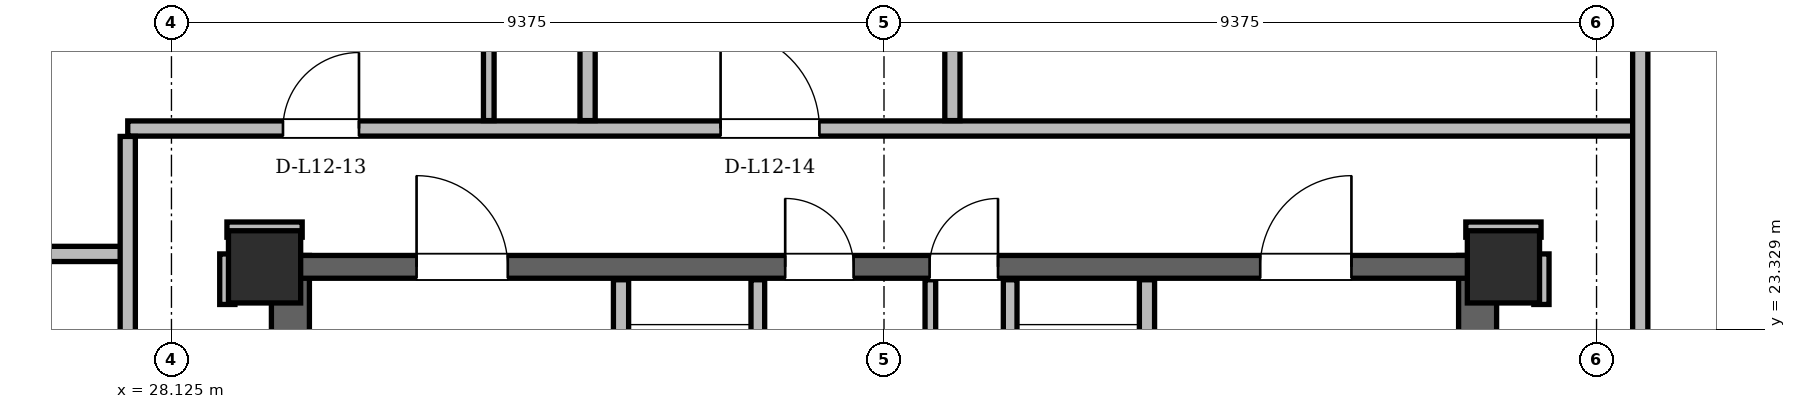
"""IFC4 building model, lengths in metres.
Left out: names, types, materials, properties, quantities, classifications, styles, units other than length and angle.
Written with IfcOpenShell. Run it as: python <this file> out.ifc"""

import sys

from ifc_helpers import new_model, si_unit, direction, frame, frame_2d, origin, origin_2d, place, context, subcontext, project, spatial, rectangle, hollow_rectangle, extrude, element, fill, save


model = new_model("IFC4")
c1 = context("Model", 3, precision=1e-05, world=origin(), true_north=direction((0.0, 1.0)))
c2 = subcontext(c1, "Body", "Model", "MODEL_VIEW")
j1 = project(units=[si_unit("LENGTHUNIT", "METRE"), si_unit("PLANEANGLEUNIT", "RADIAN")], contexts=[c1])
p1 = place(None, origin())
s1 = spatial("IfcSite", under=j1, at=p1, CompositionType="ELEMENT")
p2 = place(p1, origin())
s2 = spatial("IfcBuilding", under=s1, at=p2, CompositionType="ELEMENT")
p3 = place(p2, frame((0.0, 0.0, 48.9)))
s3 = spatial("IfcBuildingStorey", under=s2, at=p3, CompositionType="ELEMENT", Elevation=48.9)
for number, where, z_axis, x_axis in (
    (1, (45.65, 24.15, 0.0), (0.0, 0.0, 1.0), (1.0, 0.0, 0.0)),
    (2, (29.35, 24.15, 0.0), (0.0, 0.0, 1.0), (1.0, 0.0, 0.0)),
):
    element("IfcColumn", number, at=place(p3, frame(where, z_axis=z_axis, x_axis=x_axis)), inside=s3, PredefinedType="COLUMN", context=c2, shape_type="SweptSolid", body=[
        extrude(hollow_rectangle(XDim=0.95, YDim=0.95, WallThickness=0.08, at=origin_2d()), origin(), (0.0, 0.0, 1.0), 3.6),
    ])
for number, where, z_axis, x_axis in (
    (3, (29.69, 11.0, 0.0), (0.0, 0.0, 1.0), (0.0, 1.0, 0.0)),
    (4, (45.31, 11.0, 0.0), (0.0, 0.0, 1.0), (0.0, 1.0, 0.0)),
):
    element("IfcWall", number, at=place(p3, frame(where, z_axis=z_axis, x_axis=x_axis)), inside=s3, PredefinedType="SHEAR", context=c2, shape_type="SweptSolid", body=[
        extrude(rectangle(XDim=13.3, YDim=0.5, at=frame_2d((6.65, 0.0))), origin(), (0.0, 0.0, 1.0), 3.36),
    ])
p4 = place(p3, frame((29.65, 24.15, 0.0), z_axis=(0.0, 0.0, 1.0), x_axis=(1.0, 0.0, 0.0)))
e5 = element("IfcWall", 5, at=p4, inside=s3, PredefinedType="SHEAR", context=c2, shape_type="SweptSolid", body=[
    extrude(rectangle(XDim=15.7, YDim=0.3, at=frame_2d((7.85, 0.0))), origin(), (0.0, 0.0, 1.0), 3.36),
])
p5 = place(p4, frame((1.7, 0.0, 0.0)))
e6 = element("IfcOpeningElement", 6, at=p5, cuts=e5, PredefinedType="OPENING", context=c2, shape_type="SweptSolid", body=[
    extrude(rectangle(XDim=1.2, YDim=2.2, at=frame_2d((0.6, 1.1))), frame((0.0, 0.15, 0.0), z_axis=(0.0, -1.0, 0.0), x_axis=(1.0, 0.0, 0.0)), (0.0, 0.0, 1.0), 0.3),
])
p6 = place(p4, frame((12.8, 0.0, 0.0)))
e7 = element("IfcOpeningElement", 7, at=p6, cuts=e5, PredefinedType="OPENING", context=c2, shape_type="SweptSolid", body=[
    extrude(rectangle(XDim=1.2, YDim=2.2, at=frame_2d((0.6, 1.1))), frame((0.0, 0.15, 0.0), z_axis=(0.0, -1.0, 0.0), x_axis=(1.0, 0.0, 0.0)), (0.0, 0.0, 1.0), 0.3),
])
p7 = place(p4, frame((6.55, 0.0, 0.0)))
e8 = element("IfcOpeningElement", 8, at=p7, cuts=e5, PredefinedType="OPENING", context=c2, shape_type="SweptSolid", body=[
    extrude(rectangle(XDim=0.9, YDim=2.05, at=frame_2d((0.45, 1.025))), frame((0.0, 0.15, 0.0), z_axis=(0.0, -1.0, 0.0), x_axis=(1.0, 0.0, 0.0)), (0.0, 0.0, 1.0), 0.3),
])
p8 = place(p4, frame((8.45, 0.0, 0.0)))
e9 = element("IfcOpeningElement", 9, at=p8, cuts=e5, PredefinedType="OPENING", context=c2, shape_type="SweptSolid", body=[
    extrude(rectangle(XDim=0.9, YDim=2.05, at=frame_2d((0.45, 1.025))), frame((0.0, 0.15, 0.0), z_axis=(0.0, -1.0, 0.0), x_axis=(1.0, 0.0, 0.0)), (0.0, 0.0, 1.0), 0.3),
])
p9 = place(p3, frame((30.133, 43.584, 0.0), z_axis=(0.0, 0.0, 1.0), x_axis=(-0.499998660293, -0.866026177264, 0.0)))
e10 = element("IfcWall", 10, at=p9, inside=s3, PredefinedType="SOLIDWALL", context=c2, shape_type="SweptSolid", body=[
    extrude(rectangle(XDim=33.309, YDim=0.34, at=frame_2d((16.654, 0.0))), origin(), (0.0, 0.0, 1.0), 2.494),
])
p10 = place(p9, frame((6.159, 0.0, 0.0)))
e11 = element("IfcOpeningElement", 11, at=p10, cuts=e10, PredefinedType="OPENING", context=c2, shape_type="SweptSolid", body=[
    extrude(rectangle(XDim=1.5, YDim=2.2, at=frame_2d((0.75, 1.1))), frame((0.0, 0.17, 0.0), z_axis=(0.0, -1.0, 0.0), x_axis=(1.0, 0.0, 0.0)), (0.0, 0.0, 1.0), 0.34),
])
p11 = place(p9, frame((24.194, 0.0, 0.0)))
e12 = element("IfcOpeningElement", 12, at=p11, cuts=e10, PredefinedType="OPENING", context=c2, shape_type="SweptSolid", body=[
    extrude(rectangle(XDim=1.5, YDim=2.2, at=frame_2d((0.75, 1.1))), frame((0.0, 0.17, 0.0), z_axis=(0.0, -1.0, 0.0), x_axis=(1.0, 0.0, 0.0)), (0.0, 0.0, 1.0), 0.34),
])
p12 = place(p9, frame((29.727, 0.0, 0.85)))
e13 = element("IfcOpeningElement", 13, at=p12, cuts=e10, PredefinedType="OPENING", context=c2, shape_type="SweptSolid", body=[
    extrude(rectangle(XDim=2.2, YDim=1.534, at=frame_2d((1.1, 0.767))), frame((0.0, 0.17, 0.0), z_axis=(0.0, -1.0, 0.0), x_axis=(1.0, 0.0, 0.0)), (0.0, 0.0, 1.0), 0.34),
])
p13 = place(p9, frame((1.322, 0.0, 0.85)))
e14 = element("IfcOpeningElement", 14, at=p13, cuts=e10, PredefinedType="OPENING", context=c2, shape_type="SweptSolid", body=[
    extrude(rectangle(XDim=2.6, YDim=1.534, at=frame_2d((1.3, 0.767))), frame((0.0, 0.17, 0.0), z_axis=(0.0, -1.0, 0.0), x_axis=(1.0, 0.0, 0.0)), (0.0, 0.0, 1.0), 0.34),
])
p14 = place(p9, frame((16.823, 0.0, 0.85)))
e15 = element("IfcOpeningElement", 15, at=p14, cuts=e10, PredefinedType="OPENING", context=c2, shape_type="SweptSolid", body=[
    extrude(rectangle(XDim=2.0, YDim=1.534, at=frame_2d((1.0, 0.767))), frame((0.0, 0.17, 0.0), z_axis=(0.0, -1.0, 0.0), x_axis=(1.0, 0.0, 0.0)), (0.0, 0.0, 1.0), 0.34),
])
p15 = place(p3, frame((34.04, 19.48, 0.0), z_axis=(0.0, 0.0, 1.0), x_axis=(0.0, 1.0, 0.0)))
e16 = element("IfcWall", 16, at=p15, inside=s3, PredefinedType="PARTITIONING", context=c2, shape_type="SweptSolid", body=[
    extrude(rectangle(XDim=4.5, YDim=0.2, at=frame_2d((2.25, 0.0))), origin(), (0.0, 0.0, 1.0), 2.4),
])
p16 = place(p15, frame((2.12, 0.0, 0.0)))
e17 = element("IfcOpeningElement", 17, at=p16, cuts=e16, PredefinedType="OPENING", context=c2, shape_type="SweptSolid", body=[
    extrude(rectangle(XDim=1.1, YDim=2.2, at=frame_2d((0.55, 1.1))), frame((0.0, 0.1, 0.0), z_axis=(0.0, -1.0, 0.0), x_axis=(1.0, 0.0, 0.0)), (0.0, 0.0, 1.0), 0.2),
])
p17 = place(p3, frame((35.84, 20.96, 0.0), z_axis=(0.0, 0.0, 1.0), x_axis=(0.0, 1.0, 0.0)))
e18 = element("IfcWall", 18, at=p17, inside=s3, PredefinedType="PARTITIONING", context=c2, shape_type="SweptSolid", body=[
    extrude(rectangle(XDim=3.02, YDim=0.18, at=frame_2d((1.51, 0.0))), origin(), (0.0, 0.0, 1.0), 2.4),
])
p18 = place(p3, frame((40.96, 19.48, 0.0), z_axis=(0.0, 0.0, 1.0), x_axis=(0.0, 1.0, 0.0)))
e19 = element("IfcWall", 19, at=p18, inside=s3, PredefinedType="PARTITIONING", context=c2, shape_type="SweptSolid", body=[
    extrude(rectangle(XDim=4.5, YDim=0.2, at=frame_2d((2.25, 0.0))), origin(), (0.0, 0.0, 1.0), 2.4),
])
p19 = place(p18, frame((2.12, 0.0, 0.0)))
e20 = element("IfcOpeningElement", 20, at=p19, cuts=e19, PredefinedType="OPENING", context=c2, shape_type="SweptSolid", body=[
    extrude(rectangle(XDim=1.1, YDim=2.2, at=frame_2d((0.55, 1.1))), frame((0.0, 0.1, 0.0), z_axis=(0.0, -1.0, 0.0), x_axis=(1.0, 0.0, 0.0)), (0.0, 0.0, 1.0), 0.2),
])
p20 = place(p3, frame((39.16, 20.96, 0.0), z_axis=(0.0, 0.0, 1.0), x_axis=(0.0, 1.0, 0.0)))
e21 = element("IfcWall", 21, at=p20, inside=s3, PredefinedType="PARTITIONING", context=c2, shape_type="SweptSolid", body=[
    extrude(rectangle(XDim=3.02, YDim=0.18, at=frame_2d((1.51, 0.0))), origin(), (0.0, 0.0, 1.0), 2.4),
])
p21 = place(p3, frame((38.11, 21.06, 0.0), z_axis=(0.0, 0.0, 1.0), x_axis=(0.0, 1.0, 0.0)))
e22 = element("IfcWall", 22, at=p21, inside=s3, PredefinedType="PARTITIONING", context=c2, shape_type="SweptSolid", body=[
    extrude(rectangle(XDim=2.92, YDim=0.14, at=frame_2d((1.46, 0.0))), origin(), (0.0, 0.0, 1.0), 2.4),
])
p22 = place(p3, frame((19.212, 24.32, 0.0), z_axis=(0.0, 0.0, 1.0), x_axis=(1.0, 0.0, 0.0)))
e23 = element("IfcWall", 23, at=p22, inside=s3, PredefinedType="PARTITIONING", context=c2, shape_type="SweptSolid", body=[
    extrude(rectangle(XDim=8.338, YDim=0.2, at=frame_2d((4.169, 0.0))), origin(), (0.0, 0.0, 1.0), 2.494),
])
for number, where, z_axis, x_axis in (
    (24, (28.855, 24.64, 0.0), (0.0, 0.0, 1.0), (1.0, 0.0, 0.0)),
    (25, (45.155, 24.64, 0.0), (0.0, 0.0, 1.0), (1.0, 0.0, 0.0)),
):
    element("IfcWall", number, at=place(p3, frame(where, z_axis=z_axis, x_axis=x_axis)), inside=s3, PredefinedType="PARTITIONING", context=c2, shape_type="SweptSolid", body=[
        extrude(rectangle(XDim=0.99, YDim=0.2, at=frame_2d((0.495, 0.0))), origin(), (0.0, 0.0, 1.0), 2.738),
    ])
p23 = place(p3, frame((27.55, 25.97, 0.0), z_axis=(0.0, 0.0, 1.0), x_axis=(1.0, 0.0, 0.0)))
e26 = element("IfcWall", 26, at=p23, inside=s3, PredefinedType="PARTITIONING", context=c2, shape_type="SweptSolid", body=[
    extrude(rectangle(XDim=19.9, YDim=0.2, at=frame_2d((9.95, 0.0))), origin(), (0.0, 0.0, 1.0), 2.738),
])
p24 = place(p23, frame((2.042, 0.0, 0.0)))
e27 = element("IfcOpeningElement", 27, at=p24, cuts=e26, PredefinedType="OPENING", context=c2, shape_type="SweptSolid", body=[
    extrude(rectangle(XDim=1.0, YDim=2.18, at=frame_2d((0.5, 1.09))), frame((0.0, 0.1, 0.0), z_axis=(0.0, -1.0, 0.0), x_axis=(1.0, 0.0, 0.0)), (0.0, 0.0, 1.0), 0.2),
])
p25 = place(p23, frame((7.8, 0.0, 0.0)))
e28 = element("IfcOpeningElement", 28, at=p25, cuts=e26, PredefinedType="OPENING", context=c2, shape_type="SweptSolid", body=[
    extrude(rectangle(XDim=1.3, YDim=2.2, at=frame_2d((0.65, 1.1))), frame((0.0, 0.1, 0.0), z_axis=(0.0, -1.0, 0.0), x_axis=(1.0, 0.0, 0.0)), (0.0, 0.0, 1.0), 0.2),
])
p26 = place(p3, frame((27.55, 11.054, 0.0), z_axis=(0.0, 0.0, 1.0), x_axis=(0.0, 1.0, 0.0)))
e29 = element("IfcWall", 29, at=p26, inside=s3, PredefinedType="PARTITIONING", context=c2, shape_type="SweptSolid", body=[
    extrude(rectangle(XDim=14.812, YDim=0.2, at=frame_2d((7.406, 0.0))), origin(), (0.0, 0.0, 1.0), 2.738),
])
p27 = place(p26, frame((7.932, 0.0, 0.0)))
e30 = element("IfcOpeningElement", 30, at=p27, cuts=e29, PredefinedType="OPENING", context=c2, shape_type="SweptSolid", body=[
    extrude(rectangle(XDim=1.0, YDim=2.18, at=frame_2d((0.5, 1.09))), frame((0.0, 0.1, 0.0), z_axis=(0.0, -1.0, 0.0), x_axis=(1.0, 0.0, 0.0)), (0.0, 0.0, 1.0), 0.2),
])
p28 = place(p3, frame((28.86, 23.655, 0.0), z_axis=(0.0, 0.0, 1.0), x_axis=(0.0, 1.0, 0.0)))
e31 = element("IfcWall", 31, at=p28, inside=s3, PredefinedType="PARTITIONING", context=c2, shape_type="SweptSolid", body=[
    extrude(rectangle(XDim=0.665, YDim=0.2, at=frame_2d((0.333, 0.0))), origin(), (0.0, 0.0, 1.0), 3.36),
])
p29 = place(p3, frame((32.3, 26.074, 0.0), z_axis=(0.0, 0.0, 1.0), x_axis=(0.0, 1.0, 0.0)))
e32 = element("IfcWall", 32, at=p29, inside=s3, PredefinedType="PARTITIONING", context=c2, shape_type="SweptSolid", body=[
    extrude(rectangle(XDim=17.336, YDim=0.14, at=frame_2d((8.668, 0.0))), origin(), (0.0, 0.0, 1.0), 3.36),
])
p30 = place(p29, frame((1.424, 0.0, 0.0)))
e33 = element("IfcOpeningElement", 33, at=p30, cuts=e32, PredefinedType="OPENING", context=c2, shape_type="SweptSolid", body=[
    extrude(rectangle(XDim=0.95, YDim=2.1, at=frame_2d((0.475, 1.05))), frame((0.0, 0.07, 0.0), z_axis=(0.0, -1.0, 0.0), x_axis=(1.0, 0.0, 0.0)), (0.0, 0.0, 1.0), 0.14),
])
p31 = place(p29, frame((5.37, 0.0, 0.0)))
e34 = element("IfcOpeningElement", 34, at=p31, cuts=e32, PredefinedType="OPENING", context=c2, shape_type="SweptSolid", body=[
    extrude(rectangle(XDim=0.92, YDim=2.12, at=frame_2d((0.46, 1.06))), frame((0.0, 0.07, 0.0), z_axis=(0.0, -1.0, 0.0), x_axis=(1.0, 0.0, 0.0)), (0.0, 0.0, 1.0), 0.14),
])
p32 = place(p29, frame((8.743, 0.0, 0.0)))
e35 = element("IfcOpeningElement", 35, at=p32, cuts=e32, PredefinedType="OPENING", context=c2, shape_type="SweptSolid", body=[
    extrude(rectangle(XDim=0.95, YDim=2.1, at=frame_2d((0.475, 1.05))), frame((0.0, 0.07, 0.0), z_axis=(0.0, -1.0, 0.0), x_axis=(1.0, 0.0, 0.0)), (0.0, 0.0, 1.0), 0.14),
])
p33 = place(p29, frame((11.59, 0.0, 0.0)))
e36 = element("IfcOpeningElement", 36, at=p33, cuts=e32, PredefinedType="OPENING", context=c2, shape_type="SweptSolid", body=[
    extrude(rectangle(XDim=0.95, YDim=2.1, at=frame_2d((0.475, 1.05))), frame((0.0, 0.07, 0.0), z_axis=(0.0, -1.0, 0.0), x_axis=(1.0, 0.0, 0.0)), (0.0, 0.0, 1.0), 0.14),
])
p34 = place(p29, frame((13.97, 0.0, 0.0)))
e37 = element("IfcOpeningElement", 37, at=p34, cuts=e32, PredefinedType="OPENING", context=c2, shape_type="SweptSolid", body=[
    extrude(rectangle(XDim=0.95, YDim=2.1, at=frame_2d((0.475, 1.05))), frame((0.0, 0.07, 0.0), z_axis=(0.0, -1.0, 0.0), x_axis=(1.0, 0.0, 0.0)), (0.0, 0.0, 1.0), 0.14),
])
p35 = place(p29, frame((15.99, 0.0, 0.0)))
e38 = element("IfcOpeningElement", 38, at=p35, cuts=e32, PredefinedType="OPENING", context=c2, shape_type="SweptSolid", body=[
    extrude(rectangle(XDim=0.88, YDim=2.08, at=frame_2d((0.44, 1.04))), frame((0.0, 0.07, 0.0), z_axis=(0.0, -1.0, 0.0), x_axis=(1.0, 0.0, 0.0)), (0.0, 0.0, 1.0), 0.14),
])
for number, where, z_axis, x_axis in (
    (39, (33.6, 26.074, 0.0), (0.0, 0.0, 1.0), (0.0, 1.0, 0.0)),
    (40, (38.4, 26.074, 0.0), (0.0, 0.0, 1.0), (0.0, 1.0, 0.0)),
):
    element("IfcWall", number, at=place(p3, frame(where, z_axis=z_axis, x_axis=x_axis)), inside=s3, PredefinedType="PARTITIONING", context=c2, shape_type="SweptSolid", body=[
        extrude(rectangle(XDim=4.292, YDim=0.2, at=frame_2d((2.146, 0.0))), origin(), (0.0, 0.0, 1.0), 3.36),
    ])
p36 = place(p3, frame((46.15, 23.655, 0.0), z_axis=(0.0, 0.0, 1.0), x_axis=(0.0, 1.0, 0.0)))
e41 = element("IfcWall", 41, at=p36, inside=s3, PredefinedType="PARTITIONING", context=c2, shape_type="SweptSolid", body=[
    extrude(rectangle(XDim=0.665, YDim=0.2, at=frame_2d((0.333, 0.0))), origin(), (0.0, 0.0, 1.0), 2.946),
])
p37 = place(p3, frame((47.45, 11.054, 0.0), z_axis=(0.0, 0.0, 1.0), x_axis=(0.0, 1.0, 0.0)))
e42 = element("IfcWall", 42, at=p37, inside=s3, PredefinedType="PARTITIONING", context=c2, shape_type="SweptSolid", body=[
    extrude(rectangle(XDim=27.683, YDim=0.2, at=frame_2d((13.841, 0.0))), origin(), (0.0, 0.0, 1.0), 2.494),
])
p38 = place(p37, frame((10.989, 0.0, 0.0)))
e43 = element("IfcOpeningElement", 43, at=p38, cuts=e42, PredefinedType="OPENING", context=c2, shape_type="SweptSolid", body=[
    extrude(rectangle(XDim=1.0, YDim=2.18, at=frame_2d((0.5, 1.09))), frame((0.0, 0.1, 0.0), z_axis=(0.0, -1.0, 0.0), x_axis=(1.0, 0.0, 0.0)), (0.0, 0.0, 1.0), 0.2),
])
p39 = place(p5, origin())
e44 = element("IfcDoor", 44, at=p39, inside=s3, OperationType="SINGLE_SWING_LEFT", PredefinedType="DOOR", context=c2, shape_type="SweptSolid", body=[
    extrude(rectangle(XDim=1.2, YDim=2.2, at=frame_2d((0.6, 1.1))), frame((0.0, 0.025, 0.0), z_axis=(0.0, -1.0, 0.0), x_axis=(1.0, 0.0, 0.0)), (0.0, 0.0, 1.0), 0.05),
])
fill(e6, e44)
p40 = place(p6, origin())
e45 = element("IfcDoor", 45, at=p40, inside=s3, OperationType="SINGLE_SWING_RIGHT", PredefinedType="DOOR", context=c2, shape_type="SweptSolid", body=[
    extrude(rectangle(XDim=1.2, YDim=2.2, at=frame_2d((0.6, 1.1))), frame((0.0, 0.025, 0.0), z_axis=(0.0, -1.0, 0.0), x_axis=(1.0, 0.0, 0.0)), (0.0, 0.0, 1.0), 0.05),
])
fill(e7, e45)
p41 = place(p7, origin())
e46 = element("IfcDoor", 46, at=p41, inside=s3, OperationType="SINGLE_SWING_LEFT", PredefinedType="DOOR", context=c2, shape_type="SweptSolid", body=[
    extrude(rectangle(XDim=0.9, YDim=2.05, at=frame_2d((0.45, 1.025))), frame((0.0, 0.025, 0.0), z_axis=(0.0, -1.0, 0.0), x_axis=(1.0, 0.0, 0.0)), (0.0, 0.0, 1.0), 0.05),
])
fill(e8, e46)
p42 = place(p8, origin())
e47 = element("IfcDoor", 47, at=p42, inside=s3, OperationType="SINGLE_SWING_RIGHT", PredefinedType="DOOR", context=c2, shape_type="SweptSolid", body=[
    extrude(rectangle(XDim=0.9, YDim=2.05, at=frame_2d((0.45, 1.025))), frame((0.0, 0.025, 0.0), z_axis=(0.0, -1.0, 0.0), x_axis=(1.0, 0.0, 0.0)), (0.0, 0.0, 1.0), 0.05),
])
fill(e9, e47)
p43 = place(p24, origin())
e48 = element("IfcDoor", 48, at=p43, inside=s3, OperationType="SINGLE_SWING_RIGHT", PredefinedType="DOOR", context=c2, shape_type="SweptSolid", body=[
    extrude(rectangle(XDim=1.0, YDim=2.18, at=frame_2d((0.5, 1.09))), frame((0.0, 0.025, 0.0), z_axis=(0.0, -1.0, 0.0), x_axis=(1.0, 0.0, 0.0)), (0.0, 0.0, 1.0), 0.05),
])
fill(e27, e48)
p44 = place(p25, origin())
e49 = element("IfcDoor", 49, at=p44, inside=s3, OperationType="SINGLE_SWING_LEFT", PredefinedType="DOOR", context=c2, shape_type="SweptSolid", body=[
    extrude(rectangle(XDim=1.3, YDim=2.2, at=frame_2d((0.65, 1.1))), frame((0.0, 0.025, 0.0), z_axis=(0.0, -1.0, 0.0), x_axis=(1.0, 0.0, 0.0)), (0.0, 0.0, 1.0), 0.05),
])
fill(e28, e49)
save(model, sys.argv[1])
